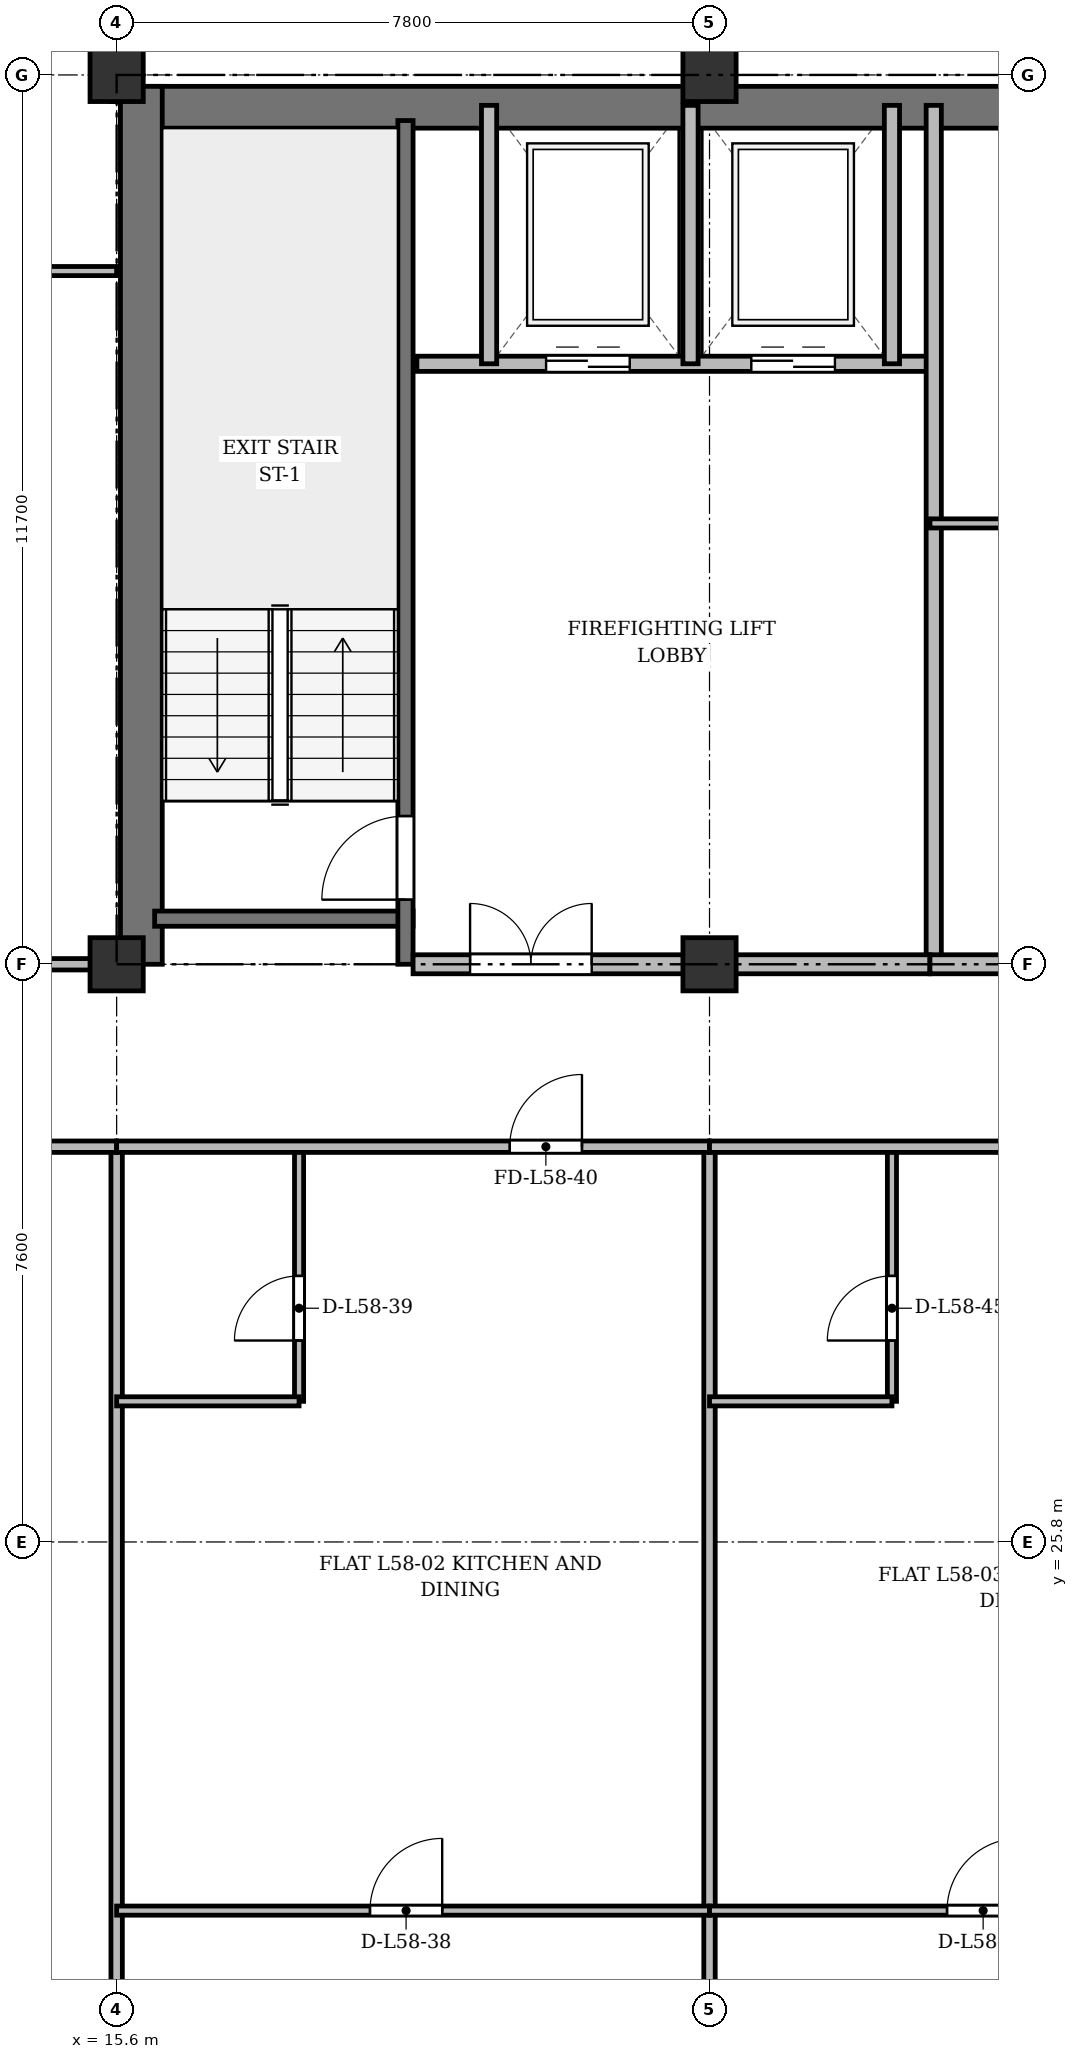
"""IFC4 building model, lengths in metres.
Left out: names, types, materials, properties, quantities, classifications, styles, units other than length and angle.
Written with IfcOpenShell. Run it as: python <this file> out.ifc"""

import sys

from ifc_helpers import new_model, si_unit, direction, frame, frame_2d, origin, origin_2d, place, context, subcontext, project, spatial, rectangle, extrude, source, transform, mapped, element, fill, save


model = new_model("IFC4")
c1 = context("Model", 3, precision=1e-05, world=origin(), true_north=direction((0.0, 1.0)))
c2 = subcontext(c1, "Body", "Model", "MODEL_VIEW")
j1 = project(units=[si_unit("LENGTHUNIT", "METRE"), si_unit("PLANEANGLEUNIT", "RADIAN")], contexts=[c1])
p1 = place(None, origin())
s1 = spatial("IfcSite", under=j1, at=p1, CompositionType="ELEMENT")
p2 = place(p1, origin())
s2 = spatial("IfcBuilding", under=s1, at=p2, CompositionType="ELEMENT")
p3 = place(p2, frame((0.0, 0.0, 222.9)))
s3 = spatial("IfcBuildingStorey", under=s2, at=p3, CompositionType="ELEMENT", Elevation=222.9)
m1 = source(origin(), c2, "Body", "SweptSolid", [
    extrude(rectangle(XDim=0.7, YDim=0.7, at=origin_2d()), origin(), (0.0, 0.0, 1.0), 3.6),
])
for number, where, z_axis, x_axis in (
    (1, (15.6, 33.4, 0.0), (0.0, 0.0, 1.0), (1.0, 0.0, 0.0)),
    (2, (15.6, 45.1, 0.0), (0.0, 0.0, 1.0), (1.0, 0.0, 0.0)),
    (3, (23.4, 33.4, 0.0), (0.0, 0.0, 1.0), (1.0, 0.0, 0.0)),
    (4, (23.4, 45.1, 0.0), (0.0, 0.0, 1.0), (1.0, 0.0, 0.0)),
):
    element("IfcColumn", number, at=place(p3, frame(where, z_axis=z_axis, x_axis=x_axis)), inside=s3, PredefinedType="COLUMN", context=c2, shape_type="MappedRepresentation", body=[
        mapped(m1, transform((0.0, 0.0, 0.0), x_axis=(1.0, 0.0, 0.0), y_axis=(0.0, 1.0, 0.0), z_axis=(0.0, 0.0, 1.0), scale=1.0)),
    ])
p4 = place(p3, frame((15.65, 44.675, 0.0), z_axis=(0.0, 0.0, 1.0), x_axis=(1.0, 0.0, 0.0)))
e5 = element("IfcWall", 5, at=p4, inside=s3, PredefinedType="SHEAR", context=c2, shape_type="SweptSolid", body=[
    extrude(rectangle(XDim=43.1, YDim=0.55, at=frame_2d((21.55, 0.0))), origin(), (0.0, 0.0, 1.0), 3.36),
])
p5 = place(p3, frame((15.925, 33.4, 0.0), z_axis=(0.0, 0.0, 1.0), x_axis=(0.0, 1.0, 0.0)))
e6 = element("IfcWall", 6, at=p5, inside=s3, PredefinedType="SHEAR", context=c2, shape_type="SweptSolid", body=[
    extrude(rectangle(XDim=11.55, YDim=0.55, at=frame_2d((5.775, 0.0))), origin(), (0.0, 0.0, 1.0), 3.36),
])
p6 = place(p3, frame((16.1, 34.0, 0.0), z_axis=(0.0, 0.0, 1.0), x_axis=(1.0, 0.0, 0.0)))
e7 = element("IfcWall", 7, at=p6, inside=s3, PredefinedType="SHEAR", context=c2, shape_type="SweptSolid", body=[
    extrude(rectangle(XDim=3.4, YDim=0.2, at=frame_2d((1.7, 0.0))), origin(), (0.0, 0.0, 1.0), 3.36),
])
p7 = place(p3, frame((19.4, 33.4, 0.0), z_axis=(0.0, 0.0, 1.0), x_axis=(0.0, 1.0, 0.0)))
e8 = element("IfcWall", 8, at=p7, inside=s3, PredefinedType="SHEAR", context=c2, shape_type="SweptSolid", body=[
    extrude(rectangle(XDim=11.1, YDim=0.2, at=frame_2d((5.55, 0.0))), origin(), (0.0, 0.0, 1.0), 3.36),
])
p8 = place(p7, frame((0.85, 0.0, 0.0)))
e9 = element("IfcOpeningElement", 9, at=p8, cuts=e8, PredefinedType="OPENING", context=c2, shape_type="SweptSolid", body=[
    extrude(rectangle(XDim=1.1, YDim=2.15, at=frame_2d((0.55, 1.075))), frame((0.0, 0.11, 0.0), z_axis=(0.0, -1.0, 0.0), x_axis=(1.0, 0.0, 0.0)), (0.0, 0.0, 1.0), 0.22),
])
p9 = place(p3, frame((19.55, 41.3, 0.0), z_axis=(0.0, 0.0, 1.0), x_axis=(1.0, 0.0, 0.0)))
e10 = element("IfcWall", 10, at=p9, inside=s3, PredefinedType="SOLIDWALL", context=c2, shape_type="SweptSolid", body=[
    extrude(rectangle(XDim=6.75, YDim=0.2, at=frame_2d((3.375, 0.0))), origin(), (0.0, 0.0, 1.0), 3.36),
])
p10 = place(p9, frame((1.7, 0.0, 0.0)))
e11 = element("IfcOpeningElement", 11, at=p10, cuts=e10, PredefinedType="OPENING", context=c2, shape_type="SweptSolid", body=[
    extrude(rectangle(XDim=1.1, YDim=2.15, at=frame_2d((0.55, 1.075))), frame((0.0, 0.11, 0.0), z_axis=(0.0, -1.0, 0.0), x_axis=(1.0, 0.0, 0.0)), (0.0, 0.0, 1.0), 0.22),
])
p11 = place(p9, frame((4.4, 0.0, 0.0)))
e12 = element("IfcOpeningElement", 12, at=p11, cuts=e10, PredefinedType="OPENING", context=c2, shape_type="SweptSolid", body=[
    extrude(rectangle(XDim=1.1, YDim=2.15, at=frame_2d((0.55, 1.075))), frame((0.0, 0.11, 0.0), z_axis=(0.0, -1.0, 0.0), x_axis=(1.0, 0.0, 0.0)), (0.0, 0.0, 1.0), 0.22),
])
for number, where, z_axis, x_axis in (
    (13, (20.5, 41.3, 0.0), (0.0, 0.0, 1.0), (0.0, 1.0, 0.0)),
    (14, (23.15, 41.3, 0.0), (0.0, 0.0, 1.0), (0.0, 1.0, 0.0)),
    (15, (25.8, 41.3, 0.0), (0.0, 0.0, 1.0), (0.0, 1.0, 0.0)),
):
    element("IfcWall", number, at=place(p3, frame(where, z_axis=z_axis, x_axis=x_axis)), inside=s3, PredefinedType="SOLIDWALL", context=c2, shape_type="SweptSolid", body=[
        extrude(rectangle(XDim=3.4, YDim=0.2, at=frame_2d((1.7, 0.0))), origin(), (0.0, 0.0, 1.0), 3.36),
    ])
p12 = place(p3, frame((26.35, 33.4, 0.0), z_axis=(0.0, 0.0, 1.0), x_axis=(0.0, 1.0, 0.0)))
e16 = element("IfcWall", 16, at=p12, inside=s3, PredefinedType="SOLIDWALL", context=c2, shape_type="SweptSolid", body=[
    extrude(rectangle(XDim=11.3, YDim=0.2, at=frame_2d((5.65, 0.0))), origin(), (0.0, 0.0, 1.0), 2.91),
])
p13 = place(p3, frame((19.5, 33.4, 0.0), z_axis=(0.0, 0.0, 1.0), x_axis=(1.0, 0.0, 0.0)))
e17 = element("IfcWall", 17, at=p13, inside=s3, PredefinedType="PARTITIONING", context=c2, shape_type="SweptSolid", body=[
    extrude(rectangle(XDim=6.8, YDim=0.25, at=frame_2d((3.4, 0.0))), origin(), (0.0, 0.0, 1.0), 2.91),
])
p14 = place(p13, frame((0.75, 0.0, 0.0)))
e18 = element("IfcOpeningElement", 18, at=p14, cuts=e17, PredefinedType="OPENING", context=c2, shape_type="SweptSolid", body=[
    extrude(rectangle(XDim=1.6, YDim=2.2, at=frame_2d((0.8, 1.1))), frame((0.0, 0.135, 0.0), z_axis=(0.0, -1.0, 0.0), x_axis=(1.0, 0.0, 0.0)), (0.0, 0.0, 1.0), 0.27),
])
p15 = place(p3, frame((26.3, 39.2, 0.0), z_axis=(0.0, 0.0, 1.0), x_axis=(1.0, 0.0, 0.0)))
e19 = element("IfcWall", 19, at=p15, inside=s3, PredefinedType="PARTITIONING", context=c2, shape_type="SweptSolid", body=[
    extrude(rectangle(XDim=7.0, YDim=0.12, at=frame_2d((3.5, 0.0))), origin(), (0.0, 0.0, 1.0), 2.86),
])
p16 = place(p15, frame((2.6, 0.0, 0.0)))
e20 = element("IfcOpeningElement", 20, at=p16, cuts=e19, PredefinedType="OPENING", context=c2, shape_type="SweptSolid", body=[
    extrude(rectangle(XDim=0.95, YDim=2.15, at=frame_2d((0.475, 1.075))), frame((0.0, 0.07, 0.0), z_axis=(0.0, -1.0, 0.0), x_axis=(1.0, 0.0, 0.0)), (0.0, 0.0, 1.0), 0.14),
])
p17 = place(p3, frame((26.3, 33.4, 0.0), z_axis=(0.0, 0.0, 1.0), x_axis=(1.0, 0.0, 0.0)))
e21 = element("IfcWall", 21, at=p17, inside=s3, PredefinedType="PARTITIONING", context=c2, shape_type="SweptSolid", body=[
    extrude(rectangle(XDim=7.0, YDim=0.25, at=frame_2d((3.5, 0.0))), origin(), (0.0, 0.0, 1.0), 2.91),
])
p18 = place(p17, frame((1.35, 0.0, 0.0)))
e22 = element("IfcOpeningElement", 22, at=p18, cuts=e21, PredefinedType="OPENING", context=c2, shape_type="SweptSolid", body=[
    extrude(rectangle(XDim=0.95, YDim=2.15, at=frame_2d((0.475, 1.075))), frame((0.0, 0.135, 0.0), z_axis=(0.0, -1.0, 0.0), x_axis=(1.0, 0.0, 0.0)), (0.0, 0.0, 1.0), 0.27),
])
p19 = place(p3, frame((11.925, 42.52, 0.0), z_axis=(0.0, 0.0, 1.0), x_axis=(1.0, 0.0, 0.0)))
e23 = element("IfcWall", 23, at=p19, inside=s3, PredefinedType="PARTITIONING", context=c2, shape_type="SweptSolid", body=[
    extrude(rectangle(XDim=3.675, YDim=0.12, at=frame_2d((1.837, 0.0))), origin(), (0.0, 0.0, 1.0), 2.86),
])
p20 = place(p19, frame((1.362, 0.0, 0.0)))
e24 = element("IfcOpeningElement", 24, at=p20, cuts=e23, PredefinedType="OPENING", context=c2, shape_type="SweptSolid", body=[
    extrude(rectangle(XDim=0.95, YDim=2.15, at=frame_2d((0.475, 1.075))), frame((0.0, 0.07, 0.0), z_axis=(0.0, -1.0, 0.0), x_axis=(1.0, 0.0, 0.0)), (0.0, 0.0, 1.0), 0.14),
])
p21 = place(p3, frame((8.25, 33.4, 0.0), z_axis=(0.0, 0.0, 1.0), x_axis=(1.0, 0.0, 0.0)))
e25 = element("IfcWall", 25, at=p21, inside=s3, PredefinedType="PARTITIONING", context=c2, shape_type="SweptSolid", body=[
    extrude(rectangle(XDim=7.35, YDim=0.15, at=frame_2d((3.675, 0.0))), origin(), (0.0, 0.0, 1.0), 2.91),
])
p22 = place(p21, frame((4.275, 0.0, 0.0)))
e26 = element("IfcOpeningElement", 26, at=p22, cuts=e25, PredefinedType="OPENING", context=c2, shape_type="SweptSolid", body=[
    extrude(rectangle(XDim=0.95, YDim=2.15, at=frame_2d((0.475, 1.075))), frame((0.0, 0.085, 0.0), z_axis=(0.0, -1.0, 0.0), x_axis=(1.0, 0.0, 0.0)), (0.0, 0.0, 1.0), 0.17),
])
p23 = place(p3, frame((15.6, 44.75, 0.0), z_axis=(0.0, 0.0, 1.0), x_axis=(0.0, 1.0, 0.0)))
e27 = element("IfcWall", 27, at=p23, inside=s3, PredefinedType="PARTITIONING", context=c2, shape_type="SweptSolid", body=[
    extrude(rectangle(XDim=3.61, YDim=0.15, at=frame_2d((1.805, 0.0))), origin(), (0.0, 0.0, 1.0), 2.86),
])
p24 = place(p23, frame((1.1, 0.0, 0.0)))
e28 = element("IfcOpeningElement", 28, at=p24, cuts=e27, PredefinedType="OPENING", context=c2, shape_type="SweptSolid", body=[
    extrude(rectangle(XDim=0.95, YDim=2.15, at=frame_2d((0.475, 1.075))), frame((0.0, 0.085, 0.0), z_axis=(0.0, -1.0, 0.0), x_axis=(1.0, 0.0, 0.0)), (0.0, 0.0, 1.0), 0.17),
])
for number, where, z_axis, x_axis in (
    (29, (15.6, 3.625, 0.0), (0.0, 0.0, 1.0), (0.0, 1.0, 0.0)),
    (30, (23.4, 3.625, 0.0), (0.0, 0.0, 1.0), (0.0, 1.0, 0.0)),
):
    element("IfcWall", number, at=place(p3, frame(where, z_axis=z_axis, x_axis=x_axis)), inside=s3, PredefinedType="PARTITIONING", context=c2, shape_type="SweptSolid", body=[
        extrude(rectangle(XDim=27.375, YDim=0.15, at=frame_2d((13.688, 0.0))), origin(), (0.0, 0.0, 1.0), 2.86),
    ])
p25 = place(p3, frame((8.225, 31.0, 0.0), z_axis=(0.0, 0.0, 1.0), x_axis=(1.0, 0.0, 0.0)))
e31 = element("IfcWall", 31, at=p25, inside=s3, PredefinedType="PARTITIONING", context=c2, shape_type="SweptSolid", body=[
    extrude(rectangle(XDim=7.375, YDim=0.15, at=frame_2d((3.688, 0.0))), origin(), (0.0, 0.0, 1.0), 2.86),
])
p26 = place(p25, frame((4.877, 0.0, 0.0)))
e32 = element("IfcOpeningElement", 32, at=p26, cuts=e31, PredefinedType="OPENING", context=c2, shape_type="SweptSolid", body=[
    extrude(rectangle(XDim=0.95, YDim=2.15, at=frame_2d((0.475, 1.075))), frame((0.0, 0.085, 0.0), z_axis=(0.0, -1.0, 0.0), x_axis=(1.0, 0.0, 0.0)), (0.0, 0.0, 1.0), 0.17),
])
p27 = place(p3, frame((15.6, 20.95, 0.0), z_axis=(0.0, 0.0, 1.0), x_axis=(1.0, 0.0, 0.0)))
e33 = element("IfcWall", 33, at=p27, inside=s3, PredefinedType="PARTITIONING", context=c2, shape_type="SweptSolid", body=[
    extrude(rectangle(XDim=7.8, YDim=0.12, at=frame_2d((3.9, 0.0))), origin(), (0.0, 0.0, 1.0), 2.86),
])
p28 = place(p27, frame((3.333, 0.0, 0.0)))
e34 = element("IfcOpeningElement", 34, at=p28, cuts=e33, PredefinedType="OPENING", context=c2, shape_type="SweptSolid", body=[
    extrude(rectangle(XDim=0.95, YDim=2.15, at=frame_2d((0.475, 1.075))), frame((0.0, 0.07, 0.0), z_axis=(0.0, -1.0, 0.0), x_axis=(1.0, 0.0, 0.0)), (0.0, 0.0, 1.0), 0.14),
])
p29 = place(p3, frame((18.0, 27.65, 0.0), z_axis=(0.0, 0.0, 1.0), x_axis=(0.0, 1.0, 0.0)))
e35 = element("IfcWall", 35, at=p29, inside=s3, PredefinedType="PARTITIONING", context=c2, shape_type="SweptSolid", body=[
    extrude(rectangle(XDim=3.35, YDim=0.12, at=frame_2d((1.675, 0.0))), origin(), (0.0, 0.0, 1.0), 3.36),
])
p30 = place(p29, frame((0.8, 0.0, 0.0)))
e36 = element("IfcOpeningElement", 36, at=p30, cuts=e35, PredefinedType="OPENING", context=c2, shape_type="SweptSolid", body=[
    extrude(rectangle(XDim=0.85, YDim=2.1, at=frame_2d((0.425, 1.05))), frame((0.0, 0.07, 0.0), z_axis=(0.0, -1.0, 0.0), x_axis=(1.0, 0.0, 0.0)), (0.0, 0.0, 1.0), 0.14),
])
p31 = place(p3, frame((15.6, 27.65, 0.0), z_axis=(0.0, 0.0, 1.0), x_axis=(1.0, 0.0, 0.0)))
e37 = element("IfcWall", 37, at=p31, inside=s3, PredefinedType="PARTITIONING", context=c2, shape_type="SweptSolid", body=[
    extrude(rectangle(XDim=2.4, YDim=0.12, at=frame_2d((1.2, 0.0))), origin(), (0.0, 0.0, 1.0), 2.86),
])
p32 = place(p3, frame((15.6, 31.0, 0.0), z_axis=(0.0, 0.0, 1.0), x_axis=(1.0, 0.0, 0.0)))
e38 = element("IfcWall", 38, at=p32, inside=s3, PredefinedType="PARTITIONING", context=c2, shape_type="SweptSolid", body=[
    extrude(rectangle(XDim=7.8, YDim=0.15, at=frame_2d((3.9, 0.0))), origin(), (0.0, 0.0, 1.0), 2.86),
])
p33 = place(p32, frame((5.172, 0.0, 0.0)))
e39 = element("IfcOpeningElement", 39, at=p33, cuts=e38, PredefinedType="OPENING", context=c2, shape_type="SweptSolid", body=[
    extrude(rectangle(XDim=0.95, YDim=2.15, at=frame_2d((0.475, 1.075))), frame((0.0, 0.085, 0.0), z_axis=(0.0, -1.0, 0.0), x_axis=(1.0, 0.0, 0.0)), (0.0, 0.0, 1.0), 0.17),
])
p34 = place(p3, frame((23.4, 20.95, 0.0), z_axis=(0.0, 0.0, 1.0), x_axis=(1.0, 0.0, 0.0)))
e40 = element("IfcWall", 40, at=p34, inside=s3, PredefinedType="PARTITIONING", context=c2, shape_type="SweptSolid", body=[
    extrude(rectangle(XDim=7.2, YDim=0.12, at=frame_2d((3.6, 0.0))), origin(), (0.0, 0.0, 1.0), 2.86),
])
p35 = place(p34, frame((3.125, 0.0, 0.0)))
e41 = element("IfcOpeningElement", 41, at=p35, cuts=e40, PredefinedType="OPENING", context=c2, shape_type="SweptSolid", body=[
    extrude(rectangle(XDim=0.95, YDim=2.15, at=frame_2d((0.475, 1.075))), frame((0.0, 0.07, 0.0), z_axis=(0.0, -1.0, 0.0), x_axis=(1.0, 0.0, 0.0)), (0.0, 0.0, 1.0), 0.14),
])
p36 = place(p3, frame((25.8, 27.65, 0.0), z_axis=(0.0, 0.0, 1.0), x_axis=(0.0, 1.0, 0.0)))
e42 = element("IfcWall", 42, at=p36, inside=s3, PredefinedType="PARTITIONING", context=c2, shape_type="SweptSolid", body=[
    extrude(rectangle(XDim=3.35, YDim=0.12, at=frame_2d((1.675, 0.0))), origin(), (0.0, 0.0, 1.0), 3.36),
])
p37 = place(p36, frame((0.8, 0.0, 0.0)))
e43 = element("IfcOpeningElement", 43, at=p37, cuts=e42, PredefinedType="OPENING", context=c2, shape_type="SweptSolid", body=[
    extrude(rectangle(XDim=0.85, YDim=2.1, at=frame_2d((0.425, 1.05))), frame((0.0, 0.07, 0.0), z_axis=(0.0, -1.0, 0.0), x_axis=(1.0, 0.0, 0.0)), (0.0, 0.0, 1.0), 0.14),
])
p38 = place(p3, frame((23.4, 27.65, 0.0), z_axis=(0.0, 0.0, 1.0), x_axis=(1.0, 0.0, 0.0)))
e44 = element("IfcWall", 44, at=p38, inside=s3, PredefinedType="PARTITIONING", context=c2, shape_type="SweptSolid", body=[
    extrude(rectangle(XDim=2.4, YDim=0.12, at=frame_2d((1.2, 0.0))), origin(), (0.0, 0.0, 1.0), 2.86),
])
p39 = place(p3, frame((23.4, 31.0, 0.0), z_axis=(0.0, 0.0, 1.0), x_axis=(1.0, 0.0, 0.0)))
e45 = element("IfcWall", 45, at=p39, inside=s3, PredefinedType="PARTITIONING", context=c2, shape_type="SweptSolid", body=[
    extrude(rectangle(XDim=7.2, YDim=0.15, at=frame_2d((3.6, 0.0))), origin(), (0.0, 0.0, 1.0), 2.86),
])
p40 = place(p39, frame((4.706, 0.0, 0.0)))
e46 = element("IfcOpeningElement", 46, at=p40, cuts=e45, PredefinedType="OPENING", context=c2, shape_type="SweptSolid", body=[
    extrude(rectangle(XDim=0.95, YDim=2.15, at=frame_2d((0.475, 1.075))), frame((0.0, 0.085, 0.0), z_axis=(0.0, -1.0, 0.0), x_axis=(1.0, 0.0, 0.0)), (0.0, 0.0, 1.0), 0.17),
])
m2 = source(origin(), c2, "Body", "SweptSolid", [
    extrude(rectangle(XDim=1.1, YDim=2.15, at=frame_2d((0.55, 1.075))), frame((0.0, 0.025, 0.0), z_axis=(0.0, -1.0, 0.0), x_axis=(1.0, 0.0, 0.0)), (0.0, 0.0, 1.0), 0.05),
])
p41 = place(p8, origin())
e47 = element("IfcDoor", 47, at=p41, inside=s3, OperationType="SINGLE_SWING_LEFT", PredefinedType="DOOR", context=c2, shape_type="MappedRepresentation", body=[
    mapped(m2, transform((0.0, 0.0, 0.0), x_axis=(1.0, 0.0, 0.0), y_axis=(0.0, 1.0, 0.0), z_axis=(0.0, 0.0, 1.0), scale=1.0)),
])
fill(e9, e47)
p42 = place(p10, origin())
e48 = element("IfcDoor", 48, at=p42, inside=s3, OperationType="DOUBLE_DOOR_SLIDING", PredefinedType="DOOR", context=c2, shape_type="MappedRepresentation", body=[
    mapped(m2, transform((0.0, 0.0, 0.0), x_axis=(1.0, 0.0, 0.0), y_axis=(0.0, 1.0, 0.0), z_axis=(0.0, 0.0, 1.0), scale=1.0)),
])
fill(e11, e48)
p43 = place(p11, origin())
e49 = element("IfcDoor", 49, at=p43, inside=s3, OperationType="DOUBLE_DOOR_SLIDING", PredefinedType="DOOR", context=c2, shape_type="MappedRepresentation", body=[
    mapped(m2, transform((0.0, 0.0, 0.0), x_axis=(1.0, 0.0, 0.0), y_axis=(0.0, 1.0, 0.0), z_axis=(0.0, 0.0, 1.0), scale=1.0)),
])
fill(e12, e49)
m3 = source(origin(), c2, "Body", "SweptSolid", [
    extrude(rectangle(XDim=1.6, YDim=2.2, at=frame_2d((0.8, 1.1))), frame((0.0, 0.025, 0.0), z_axis=(0.0, -1.0, 0.0), x_axis=(1.0, 0.0, 0.0)), (0.0, 0.0, 1.0), 0.05),
])
p44 = place(p14, origin())
e50 = element("IfcDoor", 50, at=p44, inside=s3, OperationType="DOUBLE_DOOR_SINGLE_SWING", PredefinedType="DOOR", context=c2, shape_type="MappedRepresentation", body=[
    mapped(m3, transform((0.0, 0.0, 0.0), x_axis=(1.0, 0.0, 0.0), y_axis=(0.0, 1.0, 0.0), z_axis=(0.0, 0.0, 1.0), scale=1.0)),
])
fill(e18, e50)
m4 = source(origin(), c2, "Body", "SweptSolid", [
    extrude(rectangle(XDim=0.95, YDim=2.15, at=frame_2d((0.475, 1.075))), frame((0.0, 0.025, 0.0), z_axis=(0.0, -1.0, 0.0), x_axis=(1.0, 0.0, 0.0)), (0.0, 0.0, 1.0), 0.05),
])
p45 = place(p28, origin())
e51 = element("IfcDoor", 51, at=p45, inside=s3, OperationType="SINGLE_SWING_RIGHT", PredefinedType="DOOR", context=c2, shape_type="MappedRepresentation", body=[
    mapped(m4, transform((0.0, 0.0, 0.0), x_axis=(1.0, 0.0, 0.0), y_axis=(0.0, 1.0, 0.0), z_axis=(0.0, 0.0, 1.0), scale=1.0)),
])
fill(e34, e51)
m5 = source(origin(), c2, "Body", "SweptSolid", [
    extrude(rectangle(XDim=0.85, YDim=2.1, at=frame_2d((0.425, 1.05))), frame((0.0, 0.025, 0.0), z_axis=(0.0, -1.0, 0.0), x_axis=(1.0, 0.0, 0.0)), (0.0, 0.0, 1.0), 0.05),
])
p46 = place(p30, origin())
e52 = element("IfcDoor", 52, at=p46, inside=s3, OperationType="SINGLE_SWING_LEFT", PredefinedType="DOOR", context=c2, shape_type="MappedRepresentation", body=[
    mapped(m5, transform((0.0, 0.0, 0.0), x_axis=(1.0, 0.0, 0.0), y_axis=(0.0, 1.0, 0.0), z_axis=(0.0, 0.0, 1.0), scale=1.0)),
])
fill(e36, e52)
p47 = place(p33, origin())
e53 = element("IfcDoor", 53, at=p47, inside=s3, OperationType="SINGLE_SWING_RIGHT", PredefinedType="DOOR", context=c2, shape_type="MappedRepresentation", body=[
    mapped(m4, transform((0.0, 0.0, 0.0), x_axis=(1.0, 0.0, 0.0), y_axis=(0.0, 1.0, 0.0), z_axis=(0.0, 0.0, 1.0), scale=1.0)),
])
fill(e39, e53)
p48 = place(p35, origin())
e54 = element("IfcDoor", 54, at=p48, inside=s3, OperationType="SINGLE_SWING_RIGHT", PredefinedType="DOOR", context=c2, shape_type="MappedRepresentation", body=[
    mapped(m4, transform((0.0, 0.0, 0.0), x_axis=(1.0, 0.0, 0.0), y_axis=(0.0, 1.0, 0.0), z_axis=(0.0, 0.0, 1.0), scale=1.0)),
])
fill(e41, e54)
p49 = place(p37, origin())
e55 = element("IfcDoor", 55, at=p49, inside=s3, OperationType="SINGLE_SWING_LEFT", PredefinedType="DOOR", context=c2, shape_type="MappedRepresentation", body=[
    mapped(m5, transform((0.0, 0.0, 0.0), x_axis=(1.0, 0.0, 0.0), y_axis=(0.0, 1.0, 0.0), z_axis=(0.0, 0.0, 1.0), scale=1.0)),
])
fill(e43, e55)
save(model, sys.argv[1])
